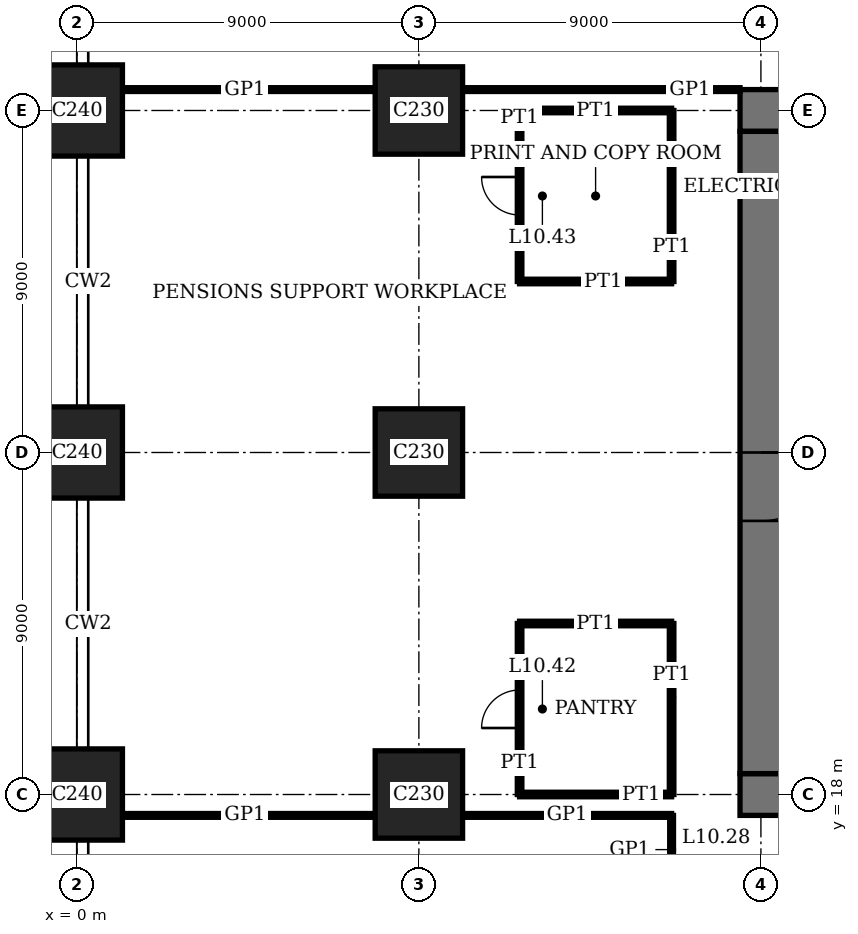
"""IFC4 building model, lengths in metres.
Left out: names, types, materials, properties, quantities, classifications, styles, units other than length and angle.
Written with IfcOpenShell. Run it as: python <this file> out.ifc"""

import sys

from ifc_helpers import new_model, si_unit, direction, frame, frame_2d, origin, origin_2d, place, context, subcontext, project, spatial, rectangle, extrude, element, fill, save


model = new_model("IFC4")
c1 = context("Model", 3, precision=1e-05, world=origin(), true_north=direction((0.0, 1.0)))
c2 = subcontext(c1, "Body", "Model", "MODEL_VIEW")
j1 = project(units=[si_unit("LENGTHUNIT", "METRE"), si_unit("PLANEANGLEUNIT", "RADIAN")], contexts=[c1])
p1 = place(None, origin())
s1 = spatial("IfcSite", under=j1, at=p1, CompositionType="ELEMENT")
p2 = place(p1, origin())
s2 = spatial("IfcBuilding", under=s1, at=p2, CompositionType="ELEMENT")
p3 = place(p2, frame((0.0, 0.0, 43.8)))
s3 = spatial("IfcBuildingStorey", under=s2, at=p3, CompositionType="ELEMENT", Elevation=43.8)
for number, where, z_axis, x_axis in (
    (1, (0.0, 18.0, 0.0), (0.0, 0.0, 1.0), (1.0, 0.0, 0.0)),
    (2, (0.0, 27.0, 0.0), (0.0, 0.0, 1.0), (1.0, 0.0, 0.0)),
    (3, (0.0, 36.0, 0.0), (0.0, 0.0, 1.0), (1.0, 0.0, 0.0)),
):
    element("IfcColumn", number, at=place(p3, frame(where, z_axis=z_axis, x_axis=x_axis)), inside=s3, PredefinedType="COLUMN", context=c2, shape_type="SweptSolid", body=[
        extrude(rectangle(XDim=2.4, YDim=2.4, at=origin_2d()), origin(), (0.0, 0.0, 1.0), 4.0),
    ])
for number, where, z_axis, x_axis in (
    (4, (9.0, 18.0, 0.0), (0.0, 0.0, 1.0), (1.0, 0.0, 0.0)),
    (5, (9.0, 27.0, 0.0), (0.0, 0.0, 1.0), (1.0, 0.0, 0.0)),
    (6, (9.0, 36.0, 0.0), (0.0, 0.0, 1.0), (1.0, 0.0, 0.0)),
):
    element("IfcColumn", number, at=place(p3, frame(where, z_axis=z_axis, x_axis=x_axis)), inside=s3, PredefinedType="COLUMN", context=c2, shape_type="SweptSolid", body=[
        extrude(rectangle(XDim=2.3, YDim=2.3, at=origin_2d()), origin(), (0.0, 0.0, 1.0), 4.0),
    ])
p4 = place(p3, frame((17.45, 18.0, 0.0), z_axis=(0.0, 0.0, 1.0), x_axis=(1.0, 0.0, 0.0)))
e7 = element("IfcWall", 7, at=p4, inside=s3, PredefinedType="SHEAR", context=c2, shape_type="SweptSolid", body=[
    extrude(rectangle(XDim=28.1, YDim=1.1, at=frame_2d((14.05, 0.0))), origin(), (0.0, 0.0, 1.0), 4.0),
])
p5 = place(p4, frame((11.55, 0.0, 0.0)))
e8 = element("IfcOpeningElement", 8, at=p5, cuts=e7, PredefinedType="OPENING", context=c2, shape_type="SweptSolid", body=[
    extrude(rectangle(XDim=1.0, YDim=2.4, at=frame_2d((0.5, 1.2))), frame((0.0, 0.56, 0.0), z_axis=(0.0, -1.0, 0.0), x_axis=(1.0, 0.0, 0.0)), (0.0, 0.0, 1.0), 1.12),
])
p6 = place(p4, frame((16.55, 0.0, 0.0)))
e9 = element("IfcOpeningElement", 9, at=p6, cuts=e7, PredefinedType="OPENING", context=c2, shape_type="SweptSolid", body=[
    extrude(rectangle(XDim=1.0, YDim=2.4, at=frame_2d((0.5, 1.2))), frame((0.0, 0.56, 0.0), z_axis=(0.0, -1.0, 0.0), x_axis=(1.0, 0.0, 0.0)), (0.0, 0.0, 1.0), 1.12),
])
p7 = place(p4, frame((20.0, 0.0, 0.0)))
e10 = element("IfcOpeningElement", 10, at=p7, cuts=e7, PredefinedType="OPENING", context=c2, shape_type="SweptSolid", body=[
    extrude(rectangle(XDim=1.1, YDim=2.4, at=frame_2d((0.55, 1.2))), frame((0.0, 0.56, 0.0), z_axis=(0.0, -1.0, 0.0), x_axis=(1.0, 0.0, 0.0)), (0.0, 0.0, 1.0), 1.12),
])
p8 = place(p4, frame((24.05, 0.0, 0.0)))
e11 = element("IfcOpeningElement", 11, at=p8, cuts=e7, PredefinedType="OPENING", context=c2, shape_type="SweptSolid", body=[
    extrude(rectangle(XDim=1.0, YDim=2.4, at=frame_2d((0.5, 1.2))), frame((0.0, 0.56, 0.0), z_axis=(0.0, -1.0, 0.0), x_axis=(1.0, 0.0, 0.0)), (0.0, 0.0, 1.0), 1.12),
])
p9 = place(p3, frame((45.55, 36.0, 0.0), z_axis=(0.0, 0.0, 1.0), x_axis=(-1.0, 0.0, 0.0)))
e12 = element("IfcWall", 12, at=p9, inside=s3, PredefinedType="SHEAR", context=c2, shape_type="SweptSolid", body=[
    extrude(rectangle(XDim=28.1, YDim=1.1, at=frame_2d((14.05, 0.0))), origin(), (0.0, 0.0, 1.0), 4.0),
])
p10 = place(p9, frame((11.55, 0.0, 0.0)))
e13 = element("IfcOpeningElement", 13, at=p10, cuts=e12, PredefinedType="OPENING", context=c2, shape_type="SweptSolid", body=[
    extrude(rectangle(XDim=1.0, YDim=2.4, at=frame_2d((0.5, 1.2))), frame((0.0, 0.56, 0.0), z_axis=(0.0, -1.0, 0.0), x_axis=(1.0, 0.0, 0.0)), (0.0, 0.0, 1.0), 1.12),
])
p11 = place(p9, frame((16.55, 0.0, 0.0)))
e14 = element("IfcOpeningElement", 14, at=p11, cuts=e12, PredefinedType="OPENING", context=c2, shape_type="SweptSolid", body=[
    extrude(rectangle(XDim=1.0, YDim=2.4, at=frame_2d((0.5, 1.2))), frame((0.0, 0.56, 0.0), z_axis=(0.0, -1.0, 0.0), x_axis=(1.0, 0.0, 0.0)), (0.0, 0.0, 1.0), 1.12),
])
p12 = place(p9, frame((20.0, 0.0, 0.0)))
e15 = element("IfcOpeningElement", 15, at=p12, cuts=e12, PredefinedType="OPENING", context=c2, shape_type="SweptSolid", body=[
    extrude(rectangle(XDim=1.1, YDim=2.4, at=frame_2d((0.55, 1.2))), frame((0.0, 0.56, 0.0), z_axis=(0.0, -1.0, 0.0), x_axis=(1.0, 0.0, 0.0)), (0.0, 0.0, 1.0), 1.12),
])
p13 = place(p9, frame((24.05, 0.0, 0.0)))
e16 = element("IfcOpeningElement", 16, at=p13, cuts=e12, PredefinedType="OPENING", context=c2, shape_type="SweptSolid", body=[
    extrude(rectangle(XDim=1.0, YDim=2.4, at=frame_2d((0.5, 1.2))), frame((0.0, 0.56, 0.0), z_axis=(0.0, -1.0, 0.0), x_axis=(1.0, 0.0, 0.0)), (0.0, 0.0, 1.0), 1.12),
])
p14 = place(p3, frame((18.0, 35.45, 0.0), z_axis=(0.0, 0.0, 1.0), x_axis=(0.0, -1.0, 0.0)))
e17 = element("IfcWall", 17, at=p14, inside=s3, PredefinedType="SHEAR", context=c2, shape_type="SweptSolid", body=[
    extrude(rectangle(XDim=16.9, YDim=1.1, at=frame_2d((8.45, 0.0))), origin(), (0.0, 0.0, 1.0), 4.0),
])
p15 = place(p14, frame((8.45, 0.0, 0.0)))
e18 = element("IfcOpeningElement", 18, at=p15, cuts=e17, PredefinedType="OPENING", context=c2, shape_type="SweptSolid", body=[
    extrude(rectangle(XDim=1.8, YDim=2.4, at=frame_2d((0.9, 1.2))), frame((0.0, 0.56, 0.0), z_axis=(0.0, -1.0, 0.0), x_axis=(1.0, 0.0, 0.0)), (0.0, 0.0, 1.0), 1.12),
])
p16 = place(p3, frame((1.2, 17.45, 0.0), z_axis=(0.0, 0.0, 1.0), x_axis=(1.0, 0.0, 0.0)))
e19 = element("IfcWall", 19, at=p16, inside=s3, PredefinedType="PARTITIONING", context=c2, shape_type="SweptSolid", body=[
    extrude(rectangle(XDim=6.65, YDim=0.1, at=frame_2d((3.325, 0.0))), origin(), (0.0, 0.0, 1.0), 3.75),
])
p17 = place(p3, frame((10.15, 17.45, 0.0), z_axis=(0.0, 0.0, 1.0), x_axis=(1.0, 0.0, 0.0)))
e20 = element("IfcWall", 20, at=p17, inside=s3, PredefinedType="PARTITIONING", context=c2, shape_type="SweptSolid", body=[
    extrude(rectangle(XDim=5.5, YDim=0.1, at=frame_2d((2.75, 0.0))), origin(), (0.0, 0.0, 1.0), 3.75),
])
p18 = place(p3, frame((11.65, 18.0, 0.0), z_axis=(0.0, 0.0, 1.0), x_axis=(1.0, 0.0, 0.0)))
e21 = element("IfcWall", 21, at=p18, inside=s3, PredefinedType="PARTITIONING", context=c2, shape_type="SweptSolid", body=[
    extrude(rectangle(XDim=4.0, YDim=0.12, at=frame_2d((2.0, 0.0))), origin(), (0.0, 0.0, 1.0), 3.05),
])
for number, where, z_axis, x_axis in (
    (22, (11.65, 22.5, 0.0), (0.0, 0.0, 1.0), (1.0, 0.0, 0.0)),
    (23, (11.65, 31.5, 0.0), (0.0, 0.0, 1.0), (1.0, 0.0, 0.0)),
):
    element("IfcWall", number, at=place(p3, frame(where, z_axis=z_axis, x_axis=x_axis)), inside=s3, PredefinedType="PARTITIONING", context=c2, shape_type="SweptSolid", body=[
        extrude(rectangle(XDim=4.0, YDim=0.12, at=frame_2d((2.0, 0.0))), origin(), (0.0, 0.0, 1.0), 3.1),
    ])
p19 = place(p3, frame((11.65, 36.0, 0.0), z_axis=(0.0, 0.0, 1.0), x_axis=(1.0, 0.0, 0.0)))
e24 = element("IfcWall", 24, at=p19, inside=s3, PredefinedType="PARTITIONING", context=c2, shape_type="SweptSolid", body=[
    extrude(rectangle(XDim=4.0, YDim=0.12, at=frame_2d((2.0, 0.0))), origin(), (0.0, 0.0, 1.0), 3.05),
])
p20 = place(p3, frame((1.2, 36.55, 0.0), z_axis=(0.0, 0.0, 1.0), x_axis=(1.0, 0.0, 0.0)))
e25 = element("IfcWall", 25, at=p20, inside=s3, PredefinedType="PARTITIONING", context=c2, shape_type="SweptSolid", body=[
    extrude(rectangle(XDim=6.65, YDim=0.1, at=frame_2d((3.325, 0.0))), origin(), (0.0, 0.0, 1.0), 3.75),
])
p21 = place(p3, frame((10.15, 36.55, 0.0), z_axis=(0.0, 0.0, 1.0), x_axis=(1.0, 0.0, 0.0)))
e26 = element("IfcWall", 26, at=p21, inside=s3, PredefinedType="PARTITIONING", context=c2, shape_type="SweptSolid", body=[
    extrude(rectangle(XDim=7.3, YDim=0.1, at=frame_2d((3.65, 0.0))), origin(), (0.0, 0.0, 1.0), 3.75),
])
p22 = place(p3, frame((11.65, 18.0, 0.0), z_axis=(0.0, 0.0, 1.0), x_axis=(0.0, 1.0, 0.0)))
e27 = element("IfcWall", 27, at=p22, inside=s3, PredefinedType="PARTITIONING", context=c2, shape_type="SweptSolid", body=[
    extrude(rectangle(XDim=4.5, YDim=0.12, at=frame_2d((2.25, 0.0))), origin(), (0.0, 0.0, 1.0), 3.75),
])
p23 = place(p22, frame((1.75, 0.0, 0.0)))
e28 = element("IfcOpeningElement", 28, at=p23, cuts=e27, PredefinedType="OPENING", context=c2, shape_type="SweptSolid", body=[
    extrude(rectangle(XDim=1.0, YDim=2.4, at=frame_2d((0.5, 1.2))), frame((0.0, 0.07, 0.0), z_axis=(0.0, -1.0, 0.0), x_axis=(1.0, 0.0, 0.0)), (0.0, 0.0, 1.0), 0.14),
])
p24 = place(p3, frame((11.65, 31.5, 0.0), z_axis=(0.0, 0.0, 1.0), x_axis=(0.0, 1.0, 0.0)))
e29 = element("IfcWall", 29, at=p24, inside=s3, PredefinedType="PARTITIONING", context=c2, shape_type="SweptSolid", body=[
    extrude(rectangle(XDim=4.5, YDim=0.12, at=frame_2d((2.25, 0.0))), origin(), (0.0, 0.0, 1.0), 3.75),
])
p25 = place(p24, frame((1.75, 0.0, 0.0)))
e30 = element("IfcOpeningElement", 30, at=p25, cuts=e29, PredefinedType="OPENING", context=c2, shape_type="SweptSolid", body=[
    extrude(rectangle(XDim=1.0, YDim=2.4, at=frame_2d((0.5, 1.2))), frame((0.0, 0.07, 0.0), z_axis=(0.0, -1.0, 0.0), x_axis=(1.0, 0.0, 0.0)), (0.0, 0.0, 1.0), 0.14),
])
for number, where, z_axis, x_axis in (
    (31, (15.65, 18.0, 0.0), (0.0, 0.0, 1.0), (0.0, 1.0, 0.0)),
    (32, (15.65, 31.5, 0.0), (0.0, 0.0, 1.0), (0.0, 1.0, 0.0)),
):
    element("IfcWall", number, at=place(p3, frame(where, z_axis=z_axis, x_axis=x_axis)), inside=s3, PredefinedType="PARTITIONING", context=c2, shape_type="SweptSolid", body=[
        extrude(rectangle(XDim=4.5, YDim=0.12, at=frame_2d((2.25, 0.0))), origin(), (0.0, 0.0, 1.0), 3.75),
    ])
p26 = place(p3, frame((15.65, 15.65, 0.0), z_axis=(0.0, 0.0, 1.0), x_axis=(0.0, 1.0, 0.0)))
e33 = element("IfcWall", 33, at=p26, inside=s3, PredefinedType="PARTITIONING", context=c2, shape_type="SweptSolid", body=[
    extrude(rectangle(XDim=1.8, YDim=0.1, at=frame_2d((0.9, 0.0))), origin(), (0.0, 0.0, 1.0), 3.75),
])
p27 = place(p15, origin())
e34 = element("IfcDoor", 34, at=p27, inside=s3, OperationType="DOUBLE_DOOR_DOUBLE_SWING", PredefinedType="DOOR", context=c2, shape_type="SweptSolid", body=[
    extrude(rectangle(XDim=1.8, YDim=2.4, at=frame_2d((0.9, 1.2))), frame((0.0, 0.03, 0.0), z_axis=(0.0, -1.0, 0.0), x_axis=(1.0, 0.0, 0.0)), (0.0, 0.0, 1.0), 0.06),
    extrude(rectangle(XDim=0.04, YDim=2.4, at=frame_2d((0.02, 1.2))), frame((0.0, 0.55, 0.0), z_axis=(0.0, -1.0, 0.0), x_axis=(1.0, 0.0, 0.0)), (0.0, 0.0, 1.0), 1.1),
    extrude(rectangle(XDim=0.04, YDim=2.4, at=frame_2d((1.78, 1.2))), frame((0.0, 0.55, 0.0), z_axis=(0.0, -1.0, 0.0), x_axis=(1.0, 0.0, 0.0)), (0.0, 0.0, 1.0), 1.1),
    extrude(rectangle(XDim=1.8, YDim=0.04, at=frame_2d((0.9, 2.38))), frame((0.0, 0.55, 0.0), z_axis=(0.0, -1.0, 0.0), x_axis=(1.0, 0.0, 0.0)), (0.0, 0.0, 1.0), 1.1),
])
fill(e18, e34)
p28 = place(p23, origin())
e35 = element("IfcDoor", 35, at=p28, inside=s3, OperationType="SINGLE_SWING_RIGHT", PredefinedType="DOOR", context=c2, shape_type="SweptSolid", body=[
    extrude(rectangle(XDim=1.0, YDim=2.4, at=frame_2d((0.5, 1.2))), frame((0.0, 0.025, 0.0), z_axis=(0.0, -1.0, 0.0), x_axis=(1.0, 0.0, 0.0)), (0.0, 0.0, 1.0), 0.05),
])
fill(e28, e35)
p29 = place(p25, origin())
e36 = element("IfcDoor", 36, at=p29, inside=s3, OperationType="SINGLE_SWING_LEFT", PredefinedType="DOOR", context=c2, shape_type="SweptSolid", body=[
    extrude(rectangle(XDim=1.0, YDim=2.4, at=frame_2d((0.5, 1.2))), frame((0.0, 0.025, 0.0), z_axis=(0.0, -1.0, 0.0), x_axis=(1.0, 0.0, 0.0)), (0.0, 0.0, 1.0), 0.05),
])
fill(e30, e36)
save(model, sys.argv[1])
